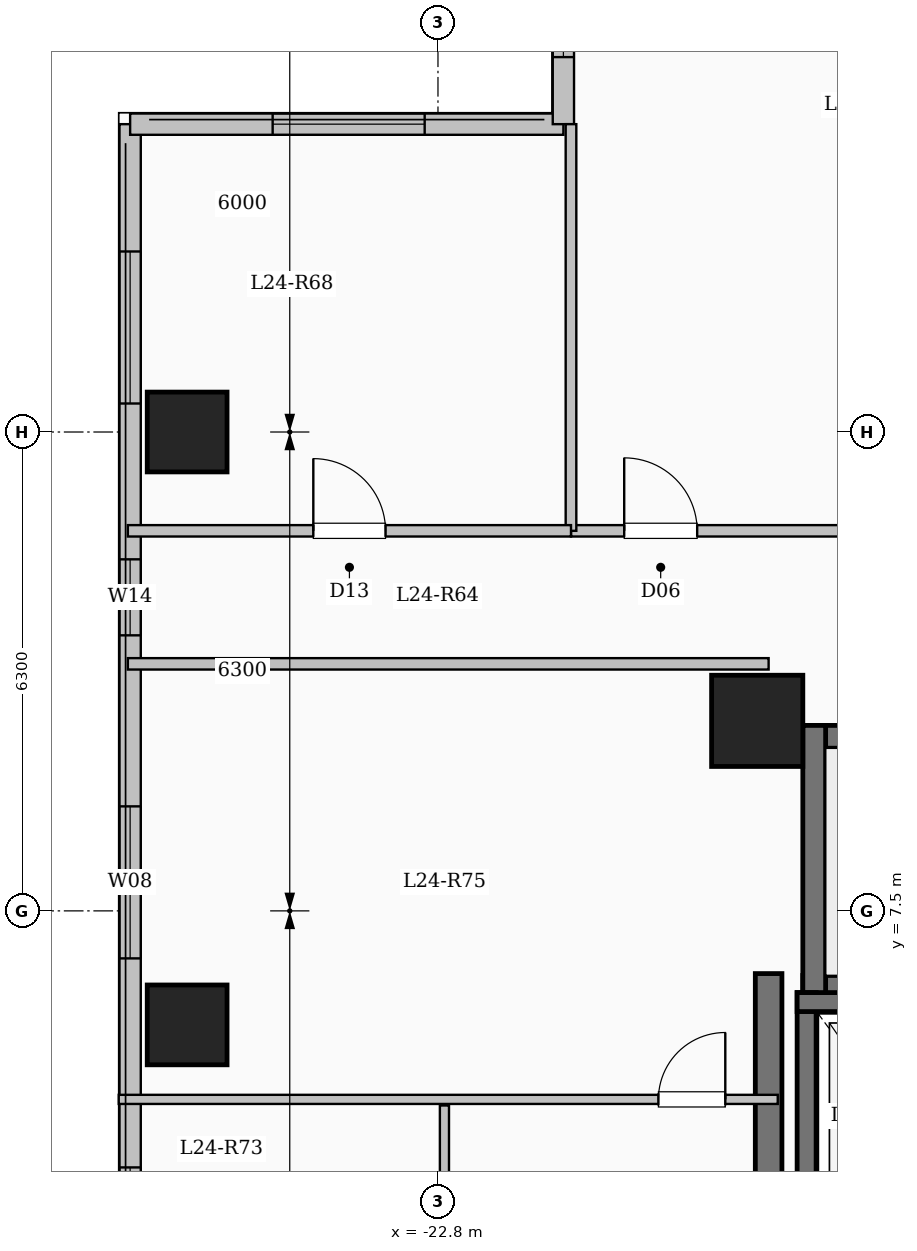
"""IFC4 building model, lengths in metres.
Left out: names, types, materials, properties, quantities, classifications, styles, units other than length and angle.
Written with IfcOpenShell. Run it as: python <this file> out.ifc"""

import sys

from ifc_helpers import new_model, si_unit, direction, frame, frame_2d, origin, origin_2d, place, context, subcontext, project, spatial, rectangle, extrude, element, fill, save


model = new_model("IFC4")
c1 = context("Model", 3, precision=1e-05, world=origin(), true_north=direction((0.0, 1.0)))
c2 = subcontext(c1, "Body", "Model", "MODEL_VIEW")
j1 = project(units=[si_unit("LENGTHUNIT", "METRE"), si_unit("PLANEANGLEUNIT", "RADIAN")], contexts=[c1])
p1 = place(None, origin())
s1 = spatial("IfcSite", under=j1, at=p1, CompositionType="ELEMENT")
p2 = place(p1, origin())
s2 = spatial("IfcBuilding", under=s1, at=p2, CompositionType="ELEMENT")
p3 = place(p2, frame((0.0, 0.0, 91.7)))
s3 = spatial("IfcBuildingStorey", under=s2, at=p3, CompositionType="ELEMENT", Elevation=91.7)
p4 = place(p3, frame((-18.6, 10.0, 0.0), z_axis=(0.0, 0.0, 1.0), x_axis=(1.0, 0.0, 0.0)))
e1 = element("IfcColumn", 1, at=p4, inside=s3, PredefinedType="COLUMN", context=c2, shape_type="SweptSolid", body=[
    extrude(rectangle(XDim=1.2, YDim=1.2, at=origin_2d()), origin(), (0.0, 0.0, 1.0), 3.35),
])
for number, where, z_axis, x_axis in (
    (2, (-26.1, 6.0, 0.0), (0.0, 0.0, 1.0), (1.0, 0.0, 0.0)),
    (3, (-26.1, 13.8, 0.0), (0.0, 0.0, 1.0), (1.0, 0.0, 0.0)),
):
    element("IfcColumn", number, at=place(p3, frame(where, z_axis=z_axis, x_axis=x_axis)), inside=s3, PredefinedType="COLUMN", context=c2, shape_type="SweptSolid", body=[
        extrude(rectangle(XDim=1.05, YDim=1.05, at=origin_2d()), origin(), (0.0, 0.0, 1.0), 3.35),
    ])
p5 = place(p3, frame((-26.85, -17.85, 0.0), z_axis=(0.0, 0.0, 1.0), x_axis=(0.0, 1.0, 0.0)))
e4 = element("IfcWall", 4, at=p5, inside=s3, PredefinedType="SOLIDWALL", context=c2, shape_type="SweptSolid", body=[
    extrude(rectangle(XDim=35.7, YDim=0.28, at=frame_2d((17.85, 0.0))), origin(), (0.0, 0.0, 1.0), 3.1),
])
p6 = place(p5, frame((2.55, 0.0, 0.9)))
e5 = element("IfcOpeningElement", 5, at=p6, cuts=e4, PredefinedType="OPENING", context=c2, shape_type="SweptSolid", body=[
    extrude(rectangle(XDim=2.4, YDim=1.8, at=frame_2d((1.2, 0.9))), frame((0.0, 0.15, 0.0), z_axis=(0.0, -1.0, 0.0), x_axis=(1.0, 0.0, 0.0)), (0.0, 0.0, 1.0), 0.3),
])
p7 = place(p5, frame((8.343, 0.0, 0.9)))
e6 = element("IfcOpeningElement", 6, at=p7, cuts=e4, PredefinedType="OPENING", context=c2, shape_type="SweptSolid", body=[
    extrude(rectangle(XDim=1.5, YDim=1.65, at=frame_2d((0.75, 0.825))), frame((0.0, 0.15, 0.0), z_axis=(0.0, -1.0, 0.0), x_axis=(1.0, 0.0, 0.0)), (0.0, 0.0, 1.0), 0.3),
])
p8 = place(p5, frame((13.75, 0.0, 0.9)))
e7 = element("IfcOpeningElement", 7, at=p8, cuts=e4, PredefinedType="OPENING", context=c2, shape_type="SweptSolid", body=[
    extrude(rectangle(XDim=2.4, YDim=1.8, at=frame_2d((1.2, 0.9))), frame((0.0, 0.15, 0.0), z_axis=(0.0, -1.0, 0.0), x_axis=(1.0, 0.0, 0.0)), (0.0, 0.0, 1.0), 0.3),
])
p9 = place(p5, frame((20.175, 0.0, 0.9)))
e8 = element("IfcOpeningElement", 8, at=p9, cuts=e4, PredefinedType="OPENING", context=c2, shape_type="SweptSolid", body=[
    extrude(rectangle(XDim=1.8, YDim=1.65, at=frame_2d((0.9, 0.825))), frame((0.0, 0.15, 0.0), z_axis=(0.0, -1.0, 0.0), x_axis=(1.0, 0.0, 0.0)), (0.0, 0.0, 1.0), 0.3),
])
p10 = place(p5, frame((24.725, 0.0, 0.9)))
e9 = element("IfcOpeningElement", 9, at=p10, cuts=e4, PredefinedType="OPENING", context=c2, shape_type="SweptSolid", body=[
    extrude(rectangle(XDim=2.0, YDim=1.7, at=frame_2d((1.0, 0.85))), frame((0.0, 0.15, 0.0), z_axis=(0.0, -1.0, 0.0), x_axis=(1.0, 0.0, 0.0)), (0.0, 0.0, 1.0), 0.3),
])
p11 = place(p5, frame((28.975, 0.0, 0.95)))
e10 = element("IfcOpeningElement", 10, at=p11, cuts=e4, PredefinedType="OPENING", context=c2, shape_type="SweptSolid", body=[
    extrude(rectangle(XDim=1.0, YDim=1.5, at=frame_2d((0.5, 0.75))), frame((0.0, 0.15, 0.0), z_axis=(0.0, -1.0, 0.0), x_axis=(1.0, 0.0, 0.0)), (0.0, 0.0, 1.0), 0.3),
])
p12 = place(p5, frame((32.025, 0.0, 0.9)))
e11 = element("IfcOpeningElement", 11, at=p12, cuts=e4, PredefinedType="OPENING", context=c2, shape_type="SweptSolid", body=[
    extrude(rectangle(XDim=2.0, YDim=1.7, at=frame_2d((1.0, 0.85))), frame((0.0, 0.15, 0.0), z_axis=(0.0, -1.0, 0.0), x_axis=(1.0, 0.0, 0.0)), (0.0, 0.0, 1.0), 0.3),
])
p13 = place(p3, frame((-26.85, 17.85, 0.0), z_axis=(0.0, 0.0, 1.0), x_axis=(1.0, 0.0, 0.0)))
e12 = element("IfcWall", 12, at=p13, inside=s3, PredefinedType="SOLIDWALL", context=c2, shape_type="SweptSolid", body=[
    extrude(rectangle(XDim=5.7, YDim=0.28, at=frame_2d((2.85, 0.0))), origin(), (0.0, 0.0, 1.0), 3.1),
])
p14 = place(p13, frame((1.875, 0.0, 0.9)))
e13 = element("IfcOpeningElement", 13, at=p14, cuts=e12, PredefinedType="OPENING", context=c2, shape_type="SweptSolid", body=[
    extrude(rectangle(XDim=2.0, YDim=1.7, at=frame_2d((1.0, 0.85))), frame((0.0, 0.15, 0.0), z_axis=(0.0, -1.0, 0.0), x_axis=(1.0, 0.0, 0.0)), (0.0, 0.0, 1.0), 0.3),
])
p15 = place(p3, frame((-21.15, 17.85, 0.0), z_axis=(0.0, 0.0, 1.0), x_axis=(0.0, 1.0, 0.0)))
e14 = element("IfcWall", 14, at=p15, inside=s3, PredefinedType="SOLIDWALL", context=c2, shape_type="SweptSolid", body=[
    extrude(rectangle(XDim=4.2, YDim=0.28, at=frame_2d((2.1, 0.0))), origin(), (0.0, 0.0, 1.0), 3.1),
])
p16 = place(p15, frame((0.882, 0.0, 0.9)))
e15 = element("IfcOpeningElement", 15, at=p16, cuts=e14, PredefinedType="OPENING", context=c2, shape_type="SweptSolid", body=[
    extrude(rectangle(XDim=2.4, YDim=1.8, at=frame_2d((1.2, 0.9))), frame((0.0, 0.15, 0.0), z_axis=(0.0, -1.0, 0.0), x_axis=(1.0, 0.0, 0.0)), (0.0, 0.0, 1.0), 0.3),
])
p17 = place(p3, frame((-18.0, 9.79, 0.0), z_axis=(0.0, 0.0, 1.0), x_axis=(1.0, 0.0, 0.0)))
e16 = element("IfcWall", 16, at=p17, inside=s3, PredefinedType="SHEAR", context=c2, shape_type="SweptSolid", body=[
    extrude(rectangle(XDim=8.0, YDim=0.3, at=frame_2d((4.0, 0.0))), origin(), (0.0, 0.0, 1.0), 3.35),
])
p18 = place(p3, frame((-18.0, 6.5, 0.0), z_axis=(0.0, 0.0, 1.0), x_axis=(1.0, 0.0, 0.0)))
e17 = element("IfcWall", 17, at=p18, inside=s3, PredefinedType="SHEAR", context=c2, shape_type="SweptSolid", body=[
    extrude(rectangle(XDim=8.0, YDim=0.3, at=frame_2d((4.0, 0.0))), origin(), (0.0, 0.0, 1.0), 3.35),
])
p19 = place(p18, frame((6.45, 0.0, 0.0)))
e18 = element("IfcOpeningElement", 18, at=p19, cuts=e17, PredefinedType="OPENING", context=c2, shape_type="SweptSolid", body=[
    extrude(rectangle(XDim=1.0, YDim=2.15, at=frame_2d((0.5, 1.075))), frame((0.0, 0.16, 0.0), z_axis=(0.0, -1.0, 0.0), x_axis=(1.0, 0.0, 0.0)), (0.0, 0.0, 1.0), 0.32),
])
p20 = place(p3, frame((-17.85, 6.35, 0.0), z_axis=(0.0, 0.0, 1.0), x_axis=(0.0, 1.0, 0.0)))
e19 = element("IfcWall", 19, at=p20, inside=s3, PredefinedType="SHEAR", context=c2, shape_type="SweptSolid", body=[
    extrude(rectangle(XDim=3.59, YDim=0.3, at=frame_2d((1.795, 0.0))), origin(), (0.0, 0.0, 1.0), 3.35),
])
p21 = place(p3, frame((-17.95, 3.175, 0.0), z_axis=(0.0, 0.0, 1.0), x_axis=(0.0, 1.0, 0.0)))
e20 = element("IfcWall", 20, at=p21, inside=s3, PredefinedType="SHEAR", context=c2, shape_type="SweptSolid", body=[
    extrude(rectangle(XDim=3.25, YDim=0.25, at=frame_2d((1.625, 0.0))), origin(), (0.0, 0.0, 1.0), 3.35),
])
p22 = place(p3, frame((-18.075, 6.3, 0.0), z_axis=(0.0, 0.0, 1.0), x_axis=(1.0, 0.0, 0.0)))
e21 = element("IfcWall", 21, at=p22, inside=s3, PredefinedType="SHEAR", context=c2, shape_type="SweptSolid", body=[
    extrude(rectangle(XDim=2.55, YDim=0.25, at=frame_2d((1.275, 0.0))), origin(), (0.0, 0.0, 1.0), 3.35),
])
p23 = place(p3, frame((-18.45, -7.375, 0.0), z_axis=(0.0, 0.0, 1.0), x_axis=(0.0, 1.0, 0.0)))
e22 = element("IfcWall", 22, at=p23, inside=s3, PredefinedType="SHEAR", context=c2, shape_type="SweptSolid", body=[
    extrude(rectangle(XDim=14.05, YDim=0.35, at=frame_2d((7.025, 0.0))), origin(), (0.0, 0.0, 1.0), 3.35),
])
p24 = place(p3, frame((-21.05, 12.5, 0.0), z_axis=(0.0, 0.0, 1.0), x_axis=(1.0, 0.0, 0.0)))
e23 = element("IfcWall", 23, at=p24, inside=s3, PredefinedType="PARTITIONING", context=c2, shape_type="SweptSolid", body=[
    extrude(rectangle(XDim=17.2, YDim=0.15, at=frame_2d((8.6, 0.0))), origin(), (0.0, 0.0, 1.0), 3.1),
])
p25 = place(p24, frame((0.7, 0.0, 0.0)))
e24 = element("IfcOpeningElement", 24, at=p25, cuts=e23, PredefinedType="OPENING", context=c2, shape_type="SweptSolid", body=[
    extrude(rectangle(XDim=0.96, YDim=2.15, at=frame_2d((0.48, 1.075))), frame((0.0, 0.085, 0.0), z_axis=(0.0, -1.0, 0.0), x_axis=(1.0, 0.0, 0.0)), (0.0, 0.0, 1.0), 0.17),
])
p26 = place(p3, frame((-26.88, 10.75, 0.0), z_axis=(0.0, 0.0, 1.0), x_axis=(1.0, 0.0, 0.0)))
e25 = element("IfcWall", 25, at=p26, inside=s3, PredefinedType="PARTITIONING", context=c2, shape_type="SweptSolid", body=[
    extrude(rectangle(XDim=8.43, YDim=0.15, at=frame_2d((4.215, 0.0))), origin(), (0.0, 0.0, 1.0), 3.1),
])
p27 = place(p3, frame((-21.05, 12.5, 0.0), z_axis=(0.0, 0.0, 1.0), x_axis=(0.0, 1.0, 0.0)))
e26 = element("IfcWall", 26, at=p27, inside=s3, PredefinedType="PARTITIONING", context=c2, shape_type="SweptSolid", body=[
    extrude(rectangle(XDim=5.35, YDim=0.14, at=frame_2d((2.675, 0.0))), origin(), (0.0, 0.0, 1.0), 3.1),
])
p28 = place(p3, frame((-26.88, 12.5, 0.0), z_axis=(0.0, 0.0, 1.0), x_axis=(1.0, 0.0, 0.0)))
e27 = element("IfcWall", 27, at=p28, inside=s3, PredefinedType="PARTITIONING", context=c2, shape_type="SweptSolid", body=[
    extrude(rectangle(XDim=5.83, YDim=0.15, at=frame_2d((2.915, 0.0))), origin(), (0.0, 0.0, 1.0), 3.1),
])
p29 = place(p28, frame((2.44, 0.0, 0.0)))
e28 = element("IfcOpeningElement", 28, at=p29, cuts=e27, PredefinedType="OPENING", context=c2, shape_type="SweptSolid", body=[
    extrude(rectangle(XDim=0.95, YDim=2.15, at=frame_2d((0.475, 1.075))), frame((0.0, 0.085, 0.0), z_axis=(0.0, -1.0, 0.0), x_axis=(1.0, 0.0, 0.0)), (0.0, 0.0, 1.0), 0.17),
])
p30 = place(p3, frame((-27.0, 5.02, 0.0), z_axis=(0.0, 0.0, 1.0), x_axis=(1.0, 0.0, 0.0)))
e29 = element("IfcWall", 29, at=p30, inside=s3, PredefinedType="PARTITIONING", context=c2, shape_type="SweptSolid", body=[
    extrude(rectangle(XDim=8.67, YDim=0.12, at=frame_2d((4.335, 0.0))), origin(), (0.0, 0.0, 1.0), 3.1),
])
p31 = place(p30, frame((7.1, 0.0, 0.0)))
e30 = element("IfcOpeningElement", 30, at=p31, cuts=e29, PredefinedType="OPENING", context=c2, shape_type="SweptSolid", body=[
    extrude(rectangle(XDim=0.88, YDim=2.1, at=frame_2d((0.44, 1.05))), frame((0.0, 0.07, 0.0), z_axis=(0.0, -1.0, 0.0), x_axis=(1.0, 0.0, 0.0)), (0.0, 0.0, 1.0), 0.14),
])
p32 = place(p3, frame((-22.715, 1.36, 0.0), z_axis=(0.0, 0.0, 1.0), x_axis=(0.0, 1.0, 0.0)))
e31 = element("IfcWall", 31, at=p32, inside=s3, PredefinedType="PARTITIONING", context=c2, shape_type="SweptSolid", body=[
    extrude(rectangle(XDim=3.58, YDim=0.12, at=frame_2d((1.79, 0.0))), origin(), (0.0, 0.0, 1.0), 3.1),
])
p33 = place(p9, origin())
e32 = element("IfcWindow", 32, at=p33, inside=s3, PartitioningType="SINGLE_PANEL", PredefinedType="WINDOW", context=c2, shape_type="SweptSolid", body=[
    extrude(rectangle(XDim=1.8, YDim=1.65, at=frame_2d((0.9, 0.825))), frame((0.0, 0.03, 0.0), z_axis=(0.0, -1.0, 0.0), x_axis=(1.0, 0.0, 0.0)), (0.0, 0.0, 1.0), 0.06),
])
fill(e8, e32)
p34 = place(p10, origin())
e33 = element("IfcWindow", 33, at=p34, inside=s3, PartitioningType="SINGLE_PANEL", PredefinedType="WINDOW", context=c2, shape_type="SweptSolid", body=[
    extrude(rectangle(XDim=2.0, YDim=1.7, at=frame_2d((1.0, 0.85))), frame((0.0, 0.03, 0.0), z_axis=(0.0, -1.0, 0.0), x_axis=(1.0, 0.0, 0.0)), (0.0, 0.0, 1.0), 0.06),
])
fill(e9, e33)
p35 = place(p11, origin())
e34 = element("IfcWindow", 34, at=p35, inside=s3, PartitioningType="SINGLE_PANEL", PredefinedType="WINDOW", context=c2, shape_type="SweptSolid", body=[
    extrude(rectangle(XDim=1.0, YDim=1.5, at=frame_2d((0.5, 0.75))), frame((0.0, 0.03, 0.0), z_axis=(0.0, -1.0, 0.0), x_axis=(1.0, 0.0, 0.0)), (0.0, 0.0, 1.0), 0.06),
])
fill(e10, e34)
p36 = place(p12, origin())
e35 = element("IfcWindow", 35, at=p36, inside=s3, PartitioningType="SINGLE_PANEL", PredefinedType="WINDOW", context=c2, shape_type="SweptSolid", body=[
    extrude(rectangle(XDim=2.0, YDim=1.7, at=frame_2d((1.0, 0.85))), frame((0.0, 0.03, 0.0), z_axis=(0.0, -1.0, 0.0), x_axis=(1.0, 0.0, 0.0)), (0.0, 0.0, 1.0), 0.06),
])
fill(e11, e35)
p37 = place(p14, origin())
e36 = element("IfcWindow", 36, at=p37, inside=s3, PartitioningType="SINGLE_PANEL", PredefinedType="WINDOW", context=c2, shape_type="SweptSolid", body=[
    extrude(rectangle(XDim=2.0, YDim=1.7, at=frame_2d((1.0, 0.85))), frame((0.0, 0.03, 0.0), z_axis=(0.0, -1.0, 0.0), x_axis=(1.0, 0.0, 0.0)), (0.0, 0.0, 1.0), 0.06),
])
fill(e13, e36)
p38 = place(p16, origin())
e37 = element("IfcWindow", 37, at=p38, inside=s3, PartitioningType="SINGLE_PANEL", PredefinedType="WINDOW", context=c2, shape_type="SweptSolid", body=[
    extrude(rectangle(XDim=2.4, YDim=1.8, at=frame_2d((1.2, 0.9))), frame((0.0, 0.03, 0.0), z_axis=(0.0, -1.0, 0.0), x_axis=(1.0, 0.0, 0.0)), (0.0, 0.0, 1.0), 0.06),
])
fill(e15, e37)
p39 = place(p25, origin())
e38 = element("IfcDoor", 38, at=p39, inside=s3, OperationType="SINGLE_SWING_LEFT", PredefinedType="DOOR", context=c2, shape_type="SweptSolid", body=[
    extrude(rectangle(XDim=0.96, YDim=2.15, at=frame_2d((0.48, 1.075))), frame((0.0, 0.025, 0.0), z_axis=(0.0, -1.0, 0.0), x_axis=(1.0, 0.0, 0.0)), (0.0, 0.0, 1.0), 0.05),
])
fill(e24, e38)
p40 = place(p29, origin())
e39 = element("IfcDoor", 39, at=p40, inside=s3, OperationType="SINGLE_SWING_LEFT", PredefinedType="DOOR", context=c2, shape_type="SweptSolid", body=[
    extrude(rectangle(XDim=0.95, YDim=2.15, at=frame_2d((0.475, 1.075))), frame((0.0, 0.025, 0.0), z_axis=(0.0, -1.0, 0.0), x_axis=(1.0, 0.0, 0.0)), (0.0, 0.0, 1.0), 0.05),
])
fill(e28, e39)
p41 = place(p31, origin())
e40 = element("IfcDoor", 40, at=p41, inside=s3, OperationType="SINGLE_SWING_RIGHT", PredefinedType="DOOR", context=c2, shape_type="SweptSolid", body=[
    extrude(rectangle(XDim=0.88, YDim=2.1, at=frame_2d((0.44, 1.05))), frame((0.0, 0.025, 0.0), z_axis=(0.0, -1.0, 0.0), x_axis=(1.0, 0.0, 0.0)), (0.0, 0.0, 1.0), 0.05),
])
fill(e30, e40)
save(model, sys.argv[1])
